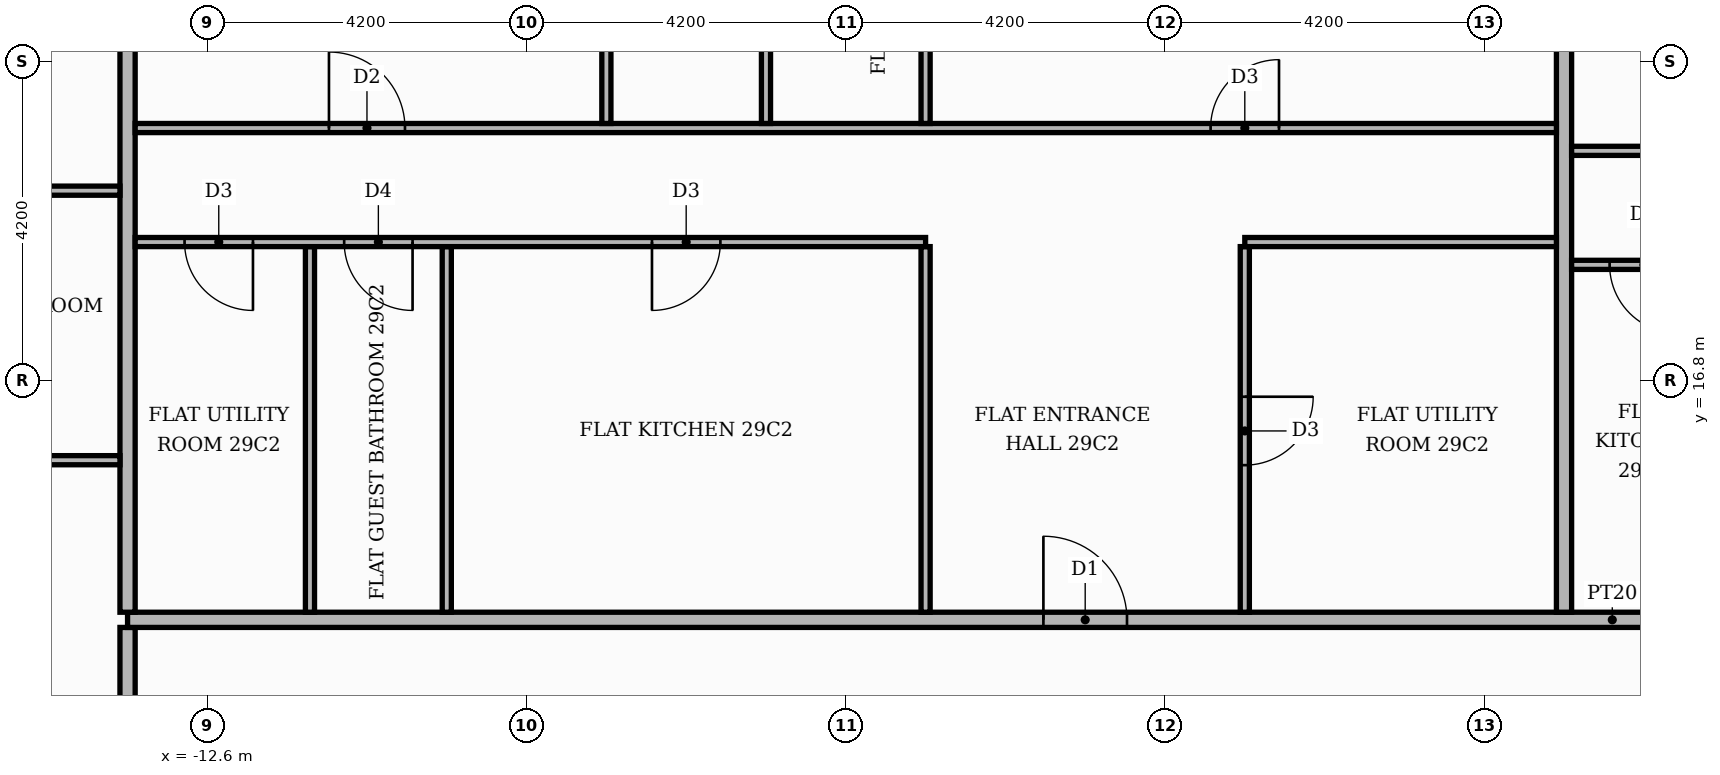
"""IFC4 building model, lengths in metres.
Left out: names, types, materials, properties, quantities, classifications, styles, units other than length and angle.
Written with IfcOpenShell. Run it as: python <this file> out.ifc"""

import sys

from ifc_helpers import new_model, si_unit, direction, frame, frame_2d, origin, place, context, subcontext, project, spatial, rectangle, extrude, element, fill, save


model = new_model("IFC4")
c1 = context("Model", 3, precision=1e-05, world=origin(), true_north=direction((0.0, 1.0)))
c2 = subcontext(c1, "Body", "Model", "MODEL_VIEW")
j1 = project(units=[si_unit("LENGTHUNIT", "METRE"), si_unit("PLANEANGLEUNIT", "RADIAN")], contexts=[c1])
p1 = place(None, origin())
s1 = spatial("IfcSite", under=j1, at=p1, CompositionType="ELEMENT")
p2 = place(p1, origin())
s2 = spatial("IfcBuilding", under=s1, at=p2, CompositionType="ELEMENT")
p3 = place(p2, frame((0.0, 0.0, 122.1)))
s3 = spatial("IfcBuildingStorey", under=s2, at=p3, CompositionType="ELEMENT", Elevation=122.1)
p4 = place(p3, frame((-13.65, 5.35, 0.0), z_axis=(0.0, 0.0, 1.0), x_axis=(0.0, 1.0, 0.0)))
e1 = element("IfcWall", 1, at=p4, inside=s3, PredefinedType="PARTITIONING", context=c2, shape_type="SweptSolid", body=[
    extrude(rectangle(XDim=8.2, YDim=0.2, at=frame_2d((4.1, 0.0))), origin(), (0.0, 0.0, 1.0), 3.4),
])
p5 = place(p4, frame((5.65, 0.0, 0.0)))
e2 = element("IfcOpeningElement", 2, at=p5, cuts=e1, PredefinedType="OPENING", context=c2, shape_type="SweptSolid", body=[
    extrude(rectangle(XDim=1.1, YDim=2.4, at=frame_2d((0.55, 1.2))), frame((0.0, 0.11, 0.0), z_axis=(0.0, -1.0, 0.0), x_axis=(1.0, 0.0, 0.0)), (0.0, 0.0, 1.0), 0.22),
])
p6 = place(p3, frame((-13.65, 13.65, 0.0), z_axis=(0.0, 0.0, 1.0), x_axis=(1.0, 0.0, 0.0)))
e3 = element("IfcWall", 3, at=p6, inside=s3, PredefinedType="PARTITIONING", context=c2, shape_type="SweptSolid", body=[
    extrude(rectangle(XDim=39.07, YDim=0.2, at=frame_2d((19.535, 0.0))), origin(), (0.0, 0.0, 1.0), 3.4),
])
p7 = place(p6, frame((24.65, 0.0, 0.0)))
e4 = element("IfcOpeningElement", 4, at=p7, cuts=e3, PredefinedType="OPENING", context=c2, shape_type="SweptSolid", body=[
    extrude(rectangle(XDim=1.1, YDim=2.4, at=frame_2d((0.55, 1.2))), frame((0.0, 0.11, 0.0), z_axis=(0.0, -1.0, 0.0), x_axis=(1.0, 0.0, 0.0)), (0.0, 0.0, 1.0), 0.22),
])
p8 = place(p6, frame((12.05, 0.0, 0.0)))
e5 = element("IfcOpeningElement", 5, at=p8, cuts=e3, PredefinedType="OPENING", context=c2, shape_type="SweptSolid", body=[
    extrude(rectangle(XDim=1.1, YDim=2.4, at=frame_2d((0.55, 1.2))), frame((0.0, 0.11, 0.0), z_axis=(0.0, -1.0, 0.0), x_axis=(1.0, 0.0, 0.0)), (0.0, 0.0, 1.0), 0.22),
])
p9 = place(p3, frame((-13.65, 13.75, 0.0), z_axis=(0.0, 0.0, 1.0), x_axis=(0.0, 1.0, 0.0)))
e6 = element("IfcWall", 6, at=p9, inside=s3, PredefinedType="PARTITIONING", context=c2, shape_type="SweptSolid", body=[
    extrude(rectangle(XDim=11.67, YDim=0.2, at=frame_2d((5.835, 0.0))), origin(), (0.0, 0.0, 1.0), 3.4),
])
for number, where, z_axis, x_axis in (
    (7, (-11.25, 13.75, 0.0), (0.0, 0.0, 1.0), (0.0, 1.0, 0.0)),
    (8, (-9.45, 13.75, 0.0), (0.0, 0.0, 1.0), (0.0, 1.0, 0.0)),
    (9, (-3.15, 13.75, 0.0), (0.0, 0.0, 1.0), (0.0, 1.0, 0.0)),
):
    element("IfcWall", number, at=place(p3, frame(where, z_axis=z_axis, x_axis=x_axis)), inside=s3, PredefinedType="PARTITIONING", context=c2, shape_type="SweptSolid", body=[
        extrude(rectangle(XDim=4.81, YDim=0.12, at=frame_2d((2.405, 0.0))), origin(), (0.0, 0.0, 1.0), 3.4),
    ])
p10 = place(p3, frame((1.05, 13.75, 0.0), z_axis=(0.0, 0.0, 1.0), x_axis=(0.0, 1.0, 0.0)))
e10 = element("IfcWall", 10, at=p10, inside=s3, PredefinedType="PARTITIONING", context=c2, shape_type="SweptSolid", body=[
    extrude(rectangle(XDim=4.81, YDim=0.12, at=frame_2d((2.405, 0.0))), origin(), (0.0, 0.0, 1.0), 3.4),
])
p11 = place(p10, frame((1.935, 0.0, 0.0)))
e11 = element("IfcOpeningElement", 11, at=p11, cuts=e10, PredefinedType="OPENING", context=c2, shape_type="SweptSolid", body=[
    extrude(rectangle(XDim=0.9, YDim=2.1, at=frame_2d((0.45, 1.05))), frame((0.0, 0.07, 0.0), z_axis=(0.0, -1.0, 0.0), x_axis=(1.0, 0.0, 0.0)), (0.0, 0.0, 1.0), 0.14),
])
p12 = place(p3, frame((5.25, 13.75, 0.0), z_axis=(0.0, 0.0, 1.0), x_axis=(0.0, 1.0, 0.0)))
e12 = element("IfcWall", 12, at=p12, inside=s3, PredefinedType="PARTITIONING", context=c2, shape_type="SweptSolid", body=[
    extrude(rectangle(XDim=11.67, YDim=0.2, at=frame_2d((5.835, 0.0))), origin(), (0.0, 0.0, 1.0), 3.4),
])
p13 = place(p3, frame((-19.82, 15.75, 0.0), z_axis=(0.0, 0.0, 1.0), x_axis=(1.0, 0.0, 0.0)))
e13 = element("IfcWall", 13, at=p13, inside=s3, PredefinedType="PARTITIONING", context=c2, shape_type="SweptSolid", body=[
    extrude(rectangle(XDim=6.07, YDim=0.12, at=frame_2d((3.035, 0.0))), origin(), (0.0, 0.0, 1.0), 3.4),
])
p14 = place(p13, frame((2.585, 0.0, 0.0)))
e14 = element("IfcOpeningElement", 14, at=p14, cuts=e13, PredefinedType="OPENING", context=c2, shape_type="SweptSolid", body=[
    extrude(rectangle(XDim=1.0, YDim=2.1, at=frame_2d((0.5, 1.05))), frame((0.0, 0.07, 0.0), z_axis=(0.0, -1.0, 0.0), x_axis=(1.0, 0.0, 0.0)), (0.0, 0.0, 1.0), 0.14),
])
p15 = place(p3, frame((5.35, 18.32, 0.0), z_axis=(0.0, 0.0, 1.0), x_axis=(1.0, 0.0, 0.0)))
e15 = element("IfcWall", 15, at=p15, inside=s3, PredefinedType="PARTITIONING", context=c2, shape_type="SweptSolid", body=[
    extrude(rectangle(XDim=4.1, YDim=0.12, at=frame_2d((2.05, 0.0))), origin(), (0.0, 0.0, 1.0), 3.4),
])
p16 = place(p15, frame((0.5, 0.0, 0.0)))
e16 = element("IfcOpeningElement", 16, at=p16, cuts=e15, PredefinedType="OPENING", context=c2, shape_type="SweptSolid", body=[
    extrude(rectangle(XDim=0.9, YDim=2.1, at=frame_2d((0.45, 1.05))), frame((0.0, 0.07, 0.0), z_axis=(0.0, -1.0, 0.0), x_axis=(1.0, 0.0, 0.0)), (0.0, 0.0, 1.0), 0.14),
])
p17 = place(p3, frame((-13.55, 18.62, 0.0), z_axis=(0.0, 0.0, 1.0), x_axis=(1.0, 0.0, 0.0)))
e17 = element("IfcWall", 17, at=p17, inside=s3, PredefinedType="PARTITIONING", context=c2, shape_type="SweptSolid", body=[
    extrude(rectangle(XDim=10.4, YDim=0.12, at=frame_2d((5.2, 0.0))), origin(), (0.0, 0.0, 1.0), 3.4),
])
p18 = place(p17, frame((6.8, 0.0, 0.0)))
e18 = element("IfcOpeningElement", 18, at=p18, cuts=e17, PredefinedType="OPENING", context=c2, shape_type="SweptSolid", body=[
    extrude(rectangle(XDim=0.9, YDim=2.1, at=frame_2d((0.45, 1.05))), frame((0.0, 0.07, 0.0), z_axis=(0.0, -1.0, 0.0), x_axis=(1.0, 0.0, 0.0)), (0.0, 0.0, 1.0), 0.14),
])
p19 = place(p17, frame((2.75, 0.0, 0.0)))
e19 = element("IfcOpeningElement", 19, at=p19, cuts=e17, PredefinedType="OPENING", context=c2, shape_type="SweptSolid", body=[
    extrude(rectangle(XDim=0.9, YDim=2.1, at=frame_2d((0.45, 1.05))), frame((0.0, 0.07, 0.0), z_axis=(0.0, -1.0, 0.0), x_axis=(1.0, 0.0, 0.0)), (0.0, 0.0, 1.0), 0.14),
])
p20 = place(p17, frame((0.65, 0.0, 0.0)))
e20 = element("IfcOpeningElement", 20, at=p20, cuts=e17, PredefinedType="OPENING", context=c2, shape_type="SweptSolid", body=[
    extrude(rectangle(XDim=0.9, YDim=2.1, at=frame_2d((0.45, 1.05))), frame((0.0, 0.07, 0.0), z_axis=(0.0, -1.0, 0.0), x_axis=(1.0, 0.0, 0.0)), (0.0, 0.0, 1.0), 0.14),
])
p21 = place(p3, frame((1.05, 18.62, 0.0), z_axis=(0.0, 0.0, 1.0), x_axis=(1.0, 0.0, 0.0)))
e21 = element("IfcWall", 21, at=p21, inside=s3, PredefinedType="PARTITIONING", context=c2, shape_type="SweptSolid", body=[
    extrude(rectangle(XDim=4.1, YDim=0.12, at=frame_2d((2.05, 0.0))), origin(), (0.0, 0.0, 1.0), 3.4),
])
p22 = place(p3, frame((-17.4, 19.296, 0.0), z_axis=(0.0, 0.0, 1.0), x_axis=(1.0, 0.0, 0.0)))
e22 = element("IfcWall", 22, at=p22, inside=s3, PredefinedType="PARTITIONING", context=c2, shape_type="SweptSolid", body=[
    extrude(rectangle(XDim=3.65, YDim=0.12, at=frame_2d((1.825, 0.0))), origin(), (0.0, 0.0, 1.0), 3.4),
])
p23 = place(p3, frame((5.35, 19.82, 0.0), z_axis=(0.0, 0.0, 1.0), x_axis=(1.0, 0.0, 0.0)))
e23 = element("IfcWall", 23, at=p23, inside=s3, PredefinedType="PARTITIONING", context=c2, shape_type="SweptSolid", body=[
    extrude(rectangle(XDim=12.05, YDim=0.12, at=frame_2d((6.025, 0.0))), origin(), (0.0, 0.0, 1.0), 3.4),
])
p24 = place(p23, frame((8.85, 0.0, 0.0)))
e24 = element("IfcOpeningElement", 24, at=p24, cuts=e23, PredefinedType="OPENING", context=c2, shape_type="SweptSolid", body=[
    extrude(rectangle(XDim=1.0, YDim=2.1, at=frame_2d((0.5, 1.05))), frame((0.0, 0.07, 0.0), z_axis=(0.0, -1.0, 0.0), x_axis=(1.0, 0.0, 0.0)), (0.0, 0.0, 1.0), 0.14),
])
p25 = place(p23, frame((5.75, 0.0, 0.0)))
e25 = element("IfcOpeningElement", 25, at=p25, cuts=e23, PredefinedType="OPENING", context=c2, shape_type="SweptSolid", body=[
    extrude(rectangle(XDim=0.9, YDim=2.1, at=frame_2d((0.45, 1.05))), frame((0.0, 0.07, 0.0), z_axis=(0.0, -1.0, 0.0), x_axis=(1.0, 0.0, 0.0)), (0.0, 0.0, 1.0), 0.14),
])
p26 = place(p3, frame((-13.55, 20.12, 0.0), z_axis=(0.0, 0.0, 1.0), x_axis=(1.0, 0.0, 0.0)))
e26 = element("IfcWall", 26, at=p26, inside=s3, PredefinedType="PARTITIONING", context=c2, shape_type="SweptSolid", body=[
    extrude(rectangle(XDim=18.7, YDim=0.12, at=frame_2d((9.35, 0.0))), origin(), (0.0, 0.0, 1.0), 3.4),
])
p27 = place(p26, frame((14.15, 0.0, 0.0)))
e27 = element("IfcOpeningElement", 27, at=p27, cuts=e26, PredefinedType="OPENING", context=c2, shape_type="SweptSolid", body=[
    extrude(rectangle(XDim=0.9, YDim=2.1, at=frame_2d((0.45, 1.05))), frame((0.0, 0.07, 0.0), z_axis=(0.0, -1.0, 0.0), x_axis=(1.0, 0.0, 0.0)), (0.0, 0.0, 1.0), 0.14),
])
p28 = place(p26, frame((2.55, 0.0, 0.0)))
e28 = element("IfcOpeningElement", 28, at=p28, cuts=e26, PredefinedType="OPENING", context=c2, shape_type="SweptSolid", body=[
    extrude(rectangle(XDim=1.0, YDim=2.1, at=frame_2d((0.5, 1.05))), frame((0.0, 0.07, 0.0), z_axis=(0.0, -1.0, 0.0), x_axis=(1.0, 0.0, 0.0)), (0.0, 0.0, 1.0), 0.14),
])
p29 = place(p3, frame((-7.35, 20.18, 0.0), z_axis=(0.0, 0.0, 1.0), x_axis=(0.0, 1.0, 0.0)))
e29 = element("IfcWall", 29, at=p29, inside=s3, PredefinedType="PARTITIONING", context=c2, shape_type="SweptSolid", body=[
    extrude(rectangle(XDim=5.24, YDim=0.12, at=frame_2d((2.62, 0.0))), origin(), (0.0, 0.0, 1.0), 3.4),
])
p30 = place(p3, frame((-5.25, 20.18, 0.0), z_axis=(0.0, 0.0, 1.0), x_axis=(0.0, 1.0, 0.0)))
e30 = element("IfcWall", 30, at=p30, inside=s3, PredefinedType="PARTITIONING", context=c2, shape_type="SweptSolid", body=[
    extrude(rectangle(XDim=5.24, YDim=0.12, at=frame_2d((2.62, 0.0))), origin(), (0.0, 0.0, 1.0), 3.4),
])
p31 = place(p30, frame((2.29, 0.0, 0.0)))
e31 = element("IfcOpeningElement", 31, at=p31, cuts=e30, PredefinedType="OPENING", context=c2, shape_type="SweptSolid", body=[
    extrude(rectangle(XDim=0.9, YDim=2.1, at=frame_2d((0.45, 1.05))), frame((0.0, 0.07, 0.0), z_axis=(0.0, -1.0, 0.0), x_axis=(1.0, 0.0, 0.0)), (0.0, 0.0, 1.0), 0.14),
])
p32 = place(p3, frame((-3.15, 20.18, 0.0), z_axis=(0.0, 0.0, 1.0), x_axis=(0.0, 1.0, 0.0)))
e32 = element("IfcWall", 32, at=p32, inside=s3, PredefinedType="PARTITIONING", context=c2, shape_type="SweptSolid", body=[
    extrude(rectangle(XDim=5.24, YDim=0.12, at=frame_2d((2.62, 0.0))), origin(), (0.0, 0.0, 1.0), 3.4),
])
p33 = place(p32, frame((2.29, 0.0, 0.0)))
e33 = element("IfcOpeningElement", 33, at=p33, cuts=e32, PredefinedType="OPENING", context=c2, shape_type="SweptSolid", body=[
    extrude(rectangle(XDim=0.9, YDim=2.1, at=frame_2d((0.45, 1.05))), frame((0.0, 0.07, 0.0), z_axis=(0.0, -1.0, 0.0), x_axis=(1.0, 0.0, 0.0)), (0.0, 0.0, 1.0), 0.14),
])
p34 = place(p16, frame((0.9, 0.0, 0.0), z_axis=(0.0, 0.0, 1.0), x_axis=(-1.0, 0.0, 0.0)))
e34 = element("IfcDoor", 34, at=p34, inside=s3, OperationType="SINGLE_SWING_RIGHT", PredefinedType="DOOR", context=c2, shape_type="SweptSolid", body=[
    extrude(rectangle(XDim=0.9, YDim=2.1, at=frame_2d((0.45, 1.05))), frame((0.0, 0.025, 0.0), z_axis=(0.0, -1.0, 0.0), x_axis=(1.0, 0.0, 0.0)), (0.0, 0.0, 1.0), 0.05),
])
fill(e16, e34)
p35 = place(p8, origin())
e35 = element("IfcDoor", 35, at=p35, inside=s3, OperationType="SINGLE_SWING_LEFT", PredefinedType="DOOR", context=c2, shape_type="SweptSolid", body=[
    extrude(rectangle(XDim=1.1, YDim=2.4, at=frame_2d((0.55, 1.2))), frame((0.0, 0.025, 0.0), z_axis=(0.0, -1.0, 0.0), x_axis=(1.0, 0.0, 0.0)), (0.0, 0.0, 1.0), 0.05),
])
fill(e5, e35)
p36 = place(p11, frame((0.9, 0.0, 0.0), z_axis=(0.0, 0.0, 1.0), x_axis=(-1.0, 0.0, 0.0)))
e36 = element("IfcDoor", 36, at=p36, inside=s3, OperationType="SINGLE_SWING_RIGHT", PredefinedType="DOOR", context=c2, shape_type="SweptSolid", body=[
    extrude(rectangle(XDim=0.9, YDim=2.1, at=frame_2d((0.45, 1.05))), frame((0.0, 0.025, 0.0), z_axis=(0.0, -1.0, 0.0), x_axis=(1.0, 0.0, 0.0)), (0.0, 0.0, 1.0), 0.05),
])
fill(e11, e36)
p37 = place(p18, frame((0.9, 0.0, 0.0), z_axis=(0.0, 0.0, 1.0), x_axis=(-1.0, 0.0, 0.0)))
e37 = element("IfcDoor", 37, at=p37, inside=s3, OperationType="SINGLE_SWING_LEFT", PredefinedType="DOOR", context=c2, shape_type="SweptSolid", body=[
    extrude(rectangle(XDim=0.9, YDim=2.1, at=frame_2d((0.45, 1.05))), frame((0.0, 0.025, 0.0), z_axis=(0.0, -1.0, 0.0), x_axis=(1.0, 0.0, 0.0)), (0.0, 0.0, 1.0), 0.05),
])
fill(e18, e37)
p38 = place(p19, frame((0.9, 0.0, 0.0), z_axis=(0.0, 0.0, 1.0), x_axis=(-1.0, 0.0, 0.0)))
e38 = element("IfcDoor", 38, at=p38, inside=s3, OperationType="SINGLE_SWING_RIGHT", PredefinedType="DOOR", context=c2, shape_type="SweptSolid", body=[
    extrude(rectangle(XDim=0.9, YDim=2.1, at=frame_2d((0.45, 1.05))), frame((0.0, 0.025, 0.0), z_axis=(0.0, -1.0, 0.0), x_axis=(1.0, 0.0, 0.0)), (0.0, 0.0, 1.0), 0.05),
])
fill(e19, e38)
p39 = place(p20, frame((0.9, 0.0, 0.0), z_axis=(0.0, 0.0, 1.0), x_axis=(-1.0, 0.0, 0.0)))
e39 = element("IfcDoor", 39, at=p39, inside=s3, OperationType="SINGLE_SWING_RIGHT", PredefinedType="DOOR", context=c2, shape_type="SweptSolid", body=[
    extrude(rectangle(XDim=0.9, YDim=2.1, at=frame_2d((0.45, 1.05))), frame((0.0, 0.025, 0.0), z_axis=(0.0, -1.0, 0.0), x_axis=(1.0, 0.0, 0.0)), (0.0, 0.0, 1.0), 0.05),
])
fill(e20, e39)
p40 = place(p27, origin())
e40 = element("IfcDoor", 40, at=p40, inside=s3, OperationType="SINGLE_SWING_RIGHT", PredefinedType="DOOR", context=c2, shape_type="SweptSolid", body=[
    extrude(rectangle(XDim=0.9, YDim=2.1, at=frame_2d((0.45, 1.05))), frame((0.0, 0.025, 0.0), z_axis=(0.0, -1.0, 0.0), x_axis=(1.0, 0.0, 0.0)), (0.0, 0.0, 1.0), 0.05),
])
fill(e27, e40)
p41 = place(p28, origin())
e41 = element("IfcDoor", 41, at=p41, inside=s3, OperationType="SINGLE_SWING_LEFT", PredefinedType="DOOR", context=c2, shape_type="SweptSolid", body=[
    extrude(rectangle(XDim=1.0, YDim=2.1, at=frame_2d((0.5, 1.05))), frame((0.0, 0.025, 0.0), z_axis=(0.0, -1.0, 0.0), x_axis=(1.0, 0.0, 0.0)), (0.0, 0.0, 1.0), 0.05),
])
fill(e28, e41)
save(model, sys.argv[1])
